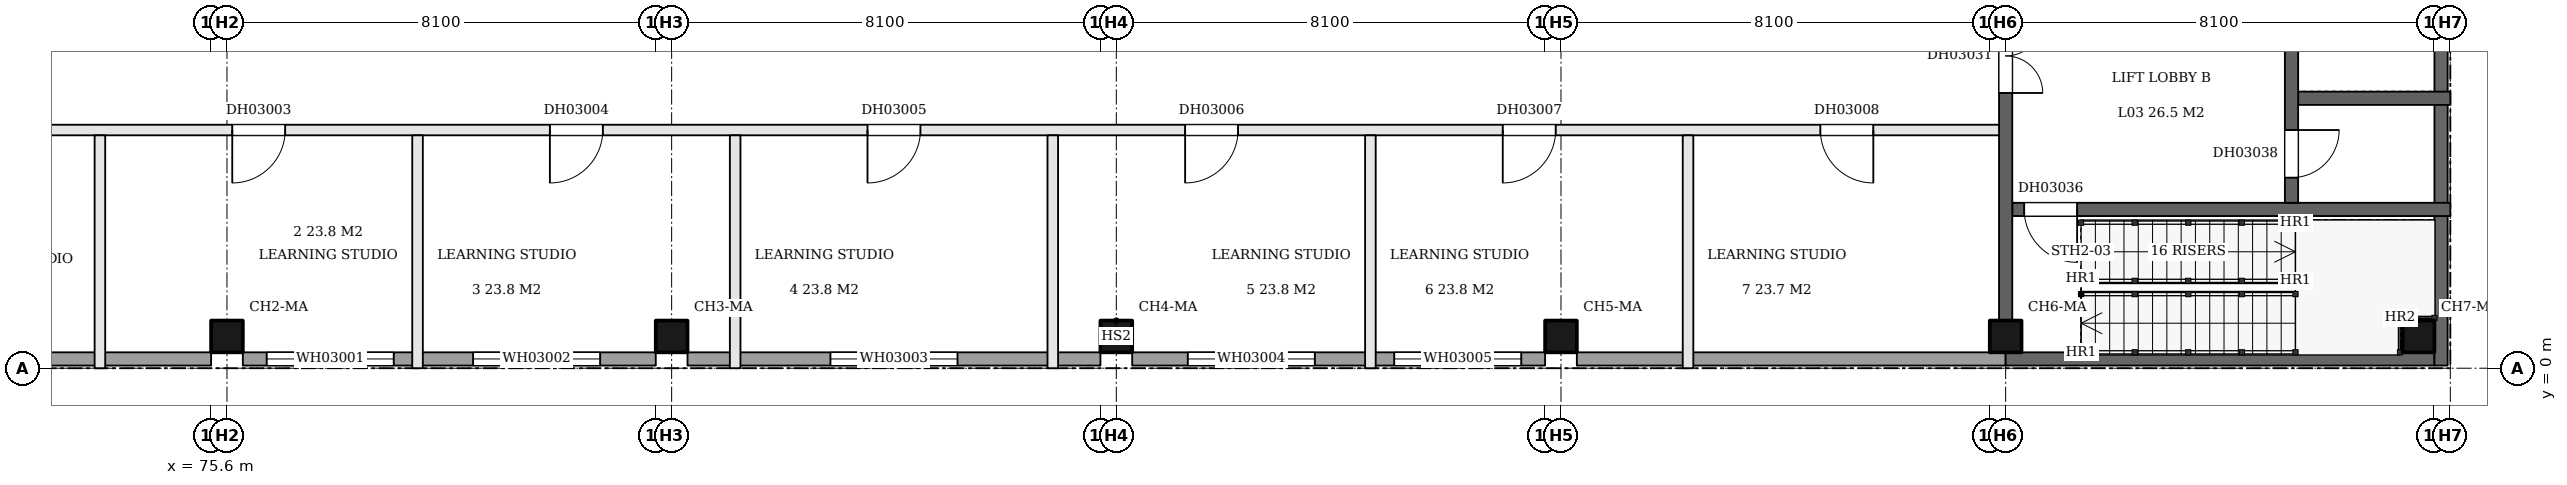
"""IFC4 building model, lengths in metres.
Left out: names, types, materials, properties, quantities, classifications, styles, units other than length and angle.
Written with IfcOpenShell. Run it as: python <this file> out.ifc"""

import sys

from ifc_helpers import new_model, si_unit, direction, frame, frame_2d, origin, origin_2d, place, context, subcontext, project, spatial, rectangle, extrude, element, fill, save


model = new_model("IFC4")
c1 = context("Model", 3, precision=1e-05, world=origin(), true_north=direction((0.0, 1.0)))
c2 = subcontext(c1, "Body", "Model", "MODEL_VIEW")
j1 = project(units=[si_unit("LENGTHUNIT", "METRE"), si_unit("PLANEANGLEUNIT", "RADIAN")], contexts=[c1])
p1 = place(None, origin())
s1 = spatial("IfcSite", under=j1, at=p1, CompositionType="ELEMENT")
p2 = place(p1, origin())
s2 = spatial("IfcBuilding", under=s1, at=p2, CompositionType="ELEMENT")
p3 = place(p2, frame((0.0, 0.0, 19.8)))
s3 = spatial("IfcBuildingStorey", under=s2, at=p3, CompositionType="ELEMENT", Elevation=19.8)
for number, where, z_axis, x_axis in (
    (1, (75.9, 0.6, 0.0), (0.0, 0.0, 1.0), (1.0, 0.0, 0.0)),
    (2, (84.3, 0.6, 0.0), (0.0, 0.0, 1.0), (1.0, 0.0, 0.0)),
    (3, (92.7, 0.6, 0.0), (0.0, 0.0, 1.0), (1.0, 0.0, 0.0)),
    (4, (101.1, 0.6, 0.0), (0.0, 0.0, 1.0), (1.0, 0.0, 0.0)),
    (5, (109.5, 0.6, 0.0), (0.0, 0.0, 1.0), (1.0, 0.0, 0.0)),
    (6, (117.3, 0.6, 0.0), (0.0, 0.0, 1.0), (1.0, 0.0, 0.0)),
):
    element("IfcColumn", number, at=place(p3, frame(where, z_axis=z_axis, x_axis=x_axis)), inside=s3, PredefinedType="COLUMN", context=c2, shape_type="SweptSolid", body=[
        extrude(rectangle(XDim=0.6, YDim=0.6, at=origin_2d()), origin(), (0.0, 0.0, 1.0), 5.0),
    ])
p4 = place(p3, frame((68.4, 0.175, 0.0), z_axis=(0.0, 0.0, 1.0), x_axis=(1.0, 0.0, 0.0)))
e7 = element("IfcWall", 7, at=p4, inside=s3, PredefinedType="SOLIDWALL", context=c2, shape_type="SweptSolid", body=[
    extrude(rectangle(XDim=7.2, YDim=0.25, at=frame_2d((3.6, 0.0))), origin(), (0.0, 0.0, 1.0), 5.0),
])
p5 = place(p3, frame((76.2, 0.175, 0.0), z_axis=(0.0, 0.0, 1.0), x_axis=(1.0, 0.0, 0.0)))
e8 = element("IfcWall", 8, at=p5, inside=s3, PredefinedType="SOLIDWALL", context=c2, shape_type="SweptSolid", body=[
    extrude(rectangle(XDim=7.8, YDim=0.25, at=frame_2d((3.9, 0.0))), origin(), (0.0, 0.0, 1.0), 5.0),
])
p6 = place(p5, frame((0.45, 0.0, 0.9)))
e9 = element("IfcOpeningElement", 9, at=p6, cuts=e8, PredefinedType="OPENING", context=c2, shape_type="SweptSolid", body=[
    extrude(rectangle(XDim=2.4, YDim=1.5, at=frame_2d((1.2, 0.75))), frame((0.0, 0.135, 0.0), z_axis=(0.0, -1.0, 0.0), x_axis=(1.0, 0.0, 0.0)), (0.0, 0.0, 1.0), 0.27),
])
p7 = place(p5, frame((4.35, 0.0, 0.9)))
e10 = element("IfcOpeningElement", 10, at=p7, cuts=e8, PredefinedType="OPENING", context=c2, shape_type="SweptSolid", body=[
    extrude(rectangle(XDim=2.4, YDim=1.5, at=frame_2d((1.2, 0.75))), frame((0.0, 0.135, 0.0), z_axis=(0.0, -1.0, 0.0), x_axis=(1.0, 0.0, 0.0)), (0.0, 0.0, 1.0), 0.27),
])
p8 = place(p3, frame((84.6, 0.175, 0.0), z_axis=(0.0, 0.0, 1.0), x_axis=(1.0, 0.0, 0.0)))
e11 = element("IfcWall", 11, at=p8, inside=s3, PredefinedType="SOLIDWALL", context=c2, shape_type="SweptSolid", body=[
    extrude(rectangle(XDim=7.8, YDim=0.25, at=frame_2d((3.9, 0.0))), origin(), (0.0, 0.0, 1.0), 5.0),
])
p9 = place(p8, frame((2.7, 0.0, 0.9)))
e12 = element("IfcOpeningElement", 12, at=p9, cuts=e11, PredefinedType="OPENING", context=c2, shape_type="SweptSolid", body=[
    extrude(rectangle(XDim=2.4, YDim=1.5, at=frame_2d((1.2, 0.75))), frame((0.0, 0.135, 0.0), z_axis=(0.0, -1.0, 0.0), x_axis=(1.0, 0.0, 0.0)), (0.0, 0.0, 1.0), 0.27),
])
p10 = place(p3, frame((93.0, 0.175, 0.0), z_axis=(0.0, 0.0, 1.0), x_axis=(1.0, 0.0, 0.0)))
e13 = element("IfcWall", 13, at=p10, inside=s3, PredefinedType="SOLIDWALL", context=c2, shape_type="SweptSolid", body=[
    extrude(rectangle(XDim=7.8, YDim=0.25, at=frame_2d((3.9, 0.0))), origin(), (0.0, 0.0, 1.0), 5.0),
])
p11 = place(p10, frame((1.05, 0.0, 0.9)))
e14 = element("IfcOpeningElement", 14, at=p11, cuts=e13, PredefinedType="OPENING", context=c2, shape_type="SweptSolid", body=[
    extrude(rectangle(XDim=2.4, YDim=1.5, at=frame_2d((1.2, 0.75))), frame((0.0, 0.135, 0.0), z_axis=(0.0, -1.0, 0.0), x_axis=(1.0, 0.0, 0.0)), (0.0, 0.0, 1.0), 0.27),
])
p12 = place(p10, frame((4.95, 0.0, 0.9)))
e15 = element("IfcOpeningElement", 15, at=p12, cuts=e13, PredefinedType="OPENING", context=c2, shape_type="SweptSolid", body=[
    extrude(rectangle(XDim=2.4, YDim=1.5, at=frame_2d((1.2, 0.75))), frame((0.0, 0.135, 0.0), z_axis=(0.0, -1.0, 0.0), x_axis=(1.0, 0.0, 0.0)), (0.0, 0.0, 1.0), 0.27),
])
p13 = place(p3, frame((101.4, 0.175, 0.0), z_axis=(0.0, 0.0, 1.0), x_axis=(1.0, 0.0, 0.0)))
e16 = element("IfcWall", 16, at=p13, inside=s3, PredefinedType="SOLIDWALL", context=c2, shape_type="SweptSolid", body=[
    extrude(rectangle(XDim=8.1, YDim=0.25, at=frame_2d((4.05, 0.0))), origin(), (0.0, 0.0, 1.0), 5.0),
])
p14 = place(p3, frame((109.5, 0.175, 0.0), z_axis=(0.0, 0.0, 1.0), x_axis=(1.0, 0.0, 0.0)))
e17 = element("IfcWall", 17, at=p14, inside=s3, PredefinedType="SHEAR", context=c2, shape_type="SweptSolid", body=[
    extrude(rectangle(XDim=8.1, YDim=0.25, at=frame_2d((4.05, 0.0))), origin(), (0.0, 0.0, 1.0), 5.0),
])
p15 = place(p3, frame((109.625, 3.0, 0.0), z_axis=(0.0, 0.0, 1.0), x_axis=(1.0, 0.0, 0.0)))
e18 = element("IfcWall", 18, at=p15, inside=s3, PredefinedType="SHEAR", context=c2, shape_type="SweptSolid", body=[
    extrude(rectangle(XDim=8.275, YDim=0.25, at=frame_2d((4.137, 0.0))), origin(), (0.0, 0.0, 1.0), 5.0),
])
p16 = place(p15, frame((0.225, 0.0, 0.0)))
e19 = element("IfcOpeningElement", 19, at=p16, cuts=e18, PredefinedType="OPENING", context=c2, shape_type="SweptSolid", body=[
    extrude(rectangle(XDim=1.0, YDim=2.1, at=frame_2d((0.5, 1.05))), frame((0.0, 0.135, 0.0), z_axis=(0.0, -1.0, 0.0), x_axis=(1.0, 0.0, 0.0)), (0.0, 0.0, 1.0), 0.27),
])
p17 = place(p3, frame((68.4, 4.5, 0.0), z_axis=(0.0, 0.0, 1.0), x_axis=(1.0, 0.0, 0.0)))
e20 = element("IfcWall", 20, at=p17, inside=s3, PredefinedType="PARTITIONING", context=c2, shape_type="SweptSolid", body=[
    extrude(rectangle(XDim=40.975, YDim=0.2, at=frame_2d((20.488, 0.0))), origin(), (0.0, 0.0, 1.0), 5.0),
])
p18 = place(p17, frame((1.6, 0.0, 0.0)))
e21 = element("IfcOpeningElement", 21, at=p18, cuts=e20, PredefinedType="OPENING", context=c2, shape_type="SweptSolid", body=[
    extrude(rectangle(XDim=1.0, YDim=2.1, at=frame_2d((0.5, 1.05))), frame((0.0, 0.11, 0.0), z_axis=(0.0, -1.0, 0.0), x_axis=(1.0, 0.0, 0.0)), (0.0, 0.0, 1.0), 0.22),
])
p19 = place(p17, frame((7.6, 0.0, 0.0)))
e22 = element("IfcOpeningElement", 22, at=p19, cuts=e20, PredefinedType="OPENING", context=c2, shape_type="SweptSolid", body=[
    extrude(rectangle(XDim=1.0, YDim=2.1, at=frame_2d((0.5, 1.05))), frame((0.0, 0.11, 0.0), z_axis=(0.0, -1.0, 0.0), x_axis=(1.0, 0.0, 0.0)), (0.0, 0.0, 1.0), 0.22),
])
p20 = place(p17, frame((13.6, 0.0, 0.0)))
e23 = element("IfcOpeningElement", 23, at=p20, cuts=e20, PredefinedType="OPENING", context=c2, shape_type="SweptSolid", body=[
    extrude(rectangle(XDim=1.0, YDim=2.1, at=frame_2d((0.5, 1.05))), frame((0.0, 0.11, 0.0), z_axis=(0.0, -1.0, 0.0), x_axis=(1.0, 0.0, 0.0)), (0.0, 0.0, 1.0), 0.22),
])
p21 = place(p17, frame((19.6, 0.0, 0.0)))
e24 = element("IfcOpeningElement", 24, at=p21, cuts=e20, PredefinedType="OPENING", context=c2, shape_type="SweptSolid", body=[
    extrude(rectangle(XDim=1.0, YDim=2.1, at=frame_2d((0.5, 1.05))), frame((0.0, 0.11, 0.0), z_axis=(0.0, -1.0, 0.0), x_axis=(1.0, 0.0, 0.0)), (0.0, 0.0, 1.0), 0.22),
])
p22 = place(p17, frame((25.6, 0.0, 0.0)))
e25 = element("IfcOpeningElement", 25, at=p22, cuts=e20, PredefinedType="OPENING", context=c2, shape_type="SweptSolid", body=[
    extrude(rectangle(XDim=1.0, YDim=2.1, at=frame_2d((0.5, 1.05))), frame((0.0, 0.11, 0.0), z_axis=(0.0, -1.0, 0.0), x_axis=(1.0, 0.0, 0.0)), (0.0, 0.0, 1.0), 0.22),
])
p23 = place(p17, frame((31.6, 0.0, 0.0)))
e26 = element("IfcOpeningElement", 26, at=p23, cuts=e20, PredefinedType="OPENING", context=c2, shape_type="SweptSolid", body=[
    extrude(rectangle(XDim=1.0, YDim=2.1, at=frame_2d((0.5, 1.05))), frame((0.0, 0.11, 0.0), z_axis=(0.0, -1.0, 0.0), x_axis=(1.0, 0.0, 0.0)), (0.0, 0.0, 1.0), 0.22),
])
p24 = place(p17, frame((37.6, 0.0, 0.0)))
e27 = element("IfcOpeningElement", 27, at=p24, cuts=e20, PredefinedType="OPENING", context=c2, shape_type="SweptSolid", body=[
    extrude(rectangle(XDim=1.0, YDim=2.1, at=frame_2d((0.5, 1.05))), frame((0.0, 0.11, 0.0), z_axis=(0.0, -1.0, 0.0), x_axis=(1.0, 0.0, 0.0)), (0.0, 0.0, 1.0), 0.22),
])
p25 = place(p3, frame((115.025, 5.1, 0.0), z_axis=(0.0, 0.0, 1.0), x_axis=(1.0, 0.0, 0.0)))
e28 = element("IfcWall", 28, at=p25, inside=s3, PredefinedType="SHEAR", context=c2, shape_type="SweptSolid", body=[
    extrude(rectangle(XDim=2.875, YDim=0.25, at=frame_2d((1.438, 0.0))), origin(), (0.0, 0.0, 1.0), 5.0),
])
for number, where, z_axis, x_axis in (
    (29, (73.5, 0.0, 0.0), (0.0, 0.0, 1.0), (0.0, 1.0, 0.0)),
    (30, (79.5, 0.0, 0.0), (0.0, 0.0, 1.0), (0.0, 1.0, 0.0)),
    (31, (85.5, 0.0, 0.0), (0.0, 0.0, 1.0), (0.0, 1.0, 0.0)),
    (32, (91.5, 0.0, 0.0), (0.0, 0.0, 1.0), (0.0, 1.0, 0.0)),
    (33, (97.5, 0.0, 0.0), (0.0, 0.0, 1.0), (0.0, 1.0, 0.0)),
    (34, (103.5, 0.0, 0.0), (0.0, 0.0, 1.0), (0.0, 1.0, 0.0)),
):
    element("IfcWall", number, at=place(p3, frame(where, z_axis=z_axis, x_axis=x_axis)), inside=s3, PredefinedType="PARTITIONING", context=c2, shape_type="SweptSolid", body=[
        extrude(rectangle(XDim=4.4, YDim=0.2, at=frame_2d((2.2, 0.0))), origin(), (0.0, 0.0, 1.0), 5.0),
    ])
p26 = place(p3, frame((109.5, 0.9, 0.0), z_axis=(0.0, 0.0, 1.0), x_axis=(0.0, 1.0, 0.0)))
e35 = element("IfcWall", 35, at=p26, inside=s3, PredefinedType="SHEAR", context=c2, shape_type="SweptSolid", body=[
    extrude(rectangle(XDim=7.2, YDim=0.25, at=frame_2d((3.6, 0.0))), origin(), (0.0, 0.0, 1.0), 5.0),
])
p27 = place(p26, frame((4.3, 0.0, 0.0)))
e36 = element("IfcOpeningElement", 36, at=p27, cuts=e35, PredefinedType="OPENING", context=c2, shape_type="SweptSolid", body=[
    extrude(rectangle(XDim=1.4, YDim=2.1, at=frame_2d((0.7, 1.05))), frame((0.0, 0.135, 0.0), z_axis=(0.0, -1.0, 0.0), x_axis=(1.0, 0.0, 0.0)), (0.0, 0.0, 1.0), 0.27),
])
p28 = place(p3, frame((114.9, 3.125, 0.0), z_axis=(0.0, 0.0, 1.0), x_axis=(0.0, 1.0, 0.0)))
e37 = element("IfcWall", 37, at=p28, inside=s3, PredefinedType="SHEAR", context=c2, shape_type="SweptSolid", body=[
    extrude(rectangle(XDim=5.15, YDim=0.25, at=frame_2d((2.575, 0.0))), origin(), (0.0, 0.0, 1.0), 5.0),
])
p29 = place(p28, frame((3.075, 0.0, 0.0)))
e38 = element("IfcOpeningElement", 38, at=p29, cuts=e37, PredefinedType="OPENING", context=c2, shape_type="SweptSolid", body=[
    extrude(rectangle(XDim=1.1, YDim=2.1, at=frame_2d((0.55, 1.05))), frame((0.0, 0.135, 0.0), z_axis=(0.0, -1.0, 0.0), x_axis=(1.0, 0.0, 0.0)), (0.0, 0.0, 1.0), 0.27),
])
p30 = place(p28, frame((0.475, 0.0, 0.0)))
e39 = element("IfcOpeningElement", 39, at=p30, cuts=e37, PredefinedType="OPENING", context=c2, shape_type="SweptSolid", body=[
    extrude(rectangle(XDim=0.9, YDim=2.1, at=frame_2d((0.45, 1.05))), frame((0.0, 0.135, 0.0), z_axis=(0.0, -1.0, 0.0), x_axis=(1.0, 0.0, 0.0)), (0.0, 0.0, 1.0), 0.27),
])
p31 = place(p3, frame((117.725, 0.05, 0.0), z_axis=(0.0, 0.0, 1.0), x_axis=(0.0, 1.0, 0.0)))
e40 = element("IfcWall", 40, at=p31, inside=s3, PredefinedType="SHEAR", context=c2, shape_type="SweptSolid", body=[
    extrude(rectangle(XDim=8.35, YDim=0.25, at=frame_2d((4.175, 0.0))), origin(), (0.0, 0.0, 1.0), 5.0),
])
p32 = place(p19, frame((1.0, 0.0, 0.0), z_axis=(0.0, 0.0, 1.0), x_axis=(-1.0, 0.0, 0.0)))
e41 = element("IfcDoor", 41, at=p32, inside=s3, OperationType="SINGLE_SWING_RIGHT", PredefinedType="DOOR", context=c2, shape_type="SweptSolid", body=[
    extrude(rectangle(XDim=1.0, YDim=2.1, at=frame_2d((0.5, 1.05))), frame((0.0, 0.025, 0.0), z_axis=(0.0, -1.0, 0.0), x_axis=(1.0, 0.0, 0.0)), (0.0, 0.0, 1.0), 0.05),
])
fill(e22, e41)
p33 = place(p20, frame((1.0, 0.0, 0.0), z_axis=(0.0, 0.0, 1.0), x_axis=(-1.0, 0.0, 0.0)))
e42 = element("IfcDoor", 42, at=p33, inside=s3, OperationType="SINGLE_SWING_RIGHT", PredefinedType="DOOR", context=c2, shape_type="SweptSolid", body=[
    extrude(rectangle(XDim=1.0, YDim=2.1, at=frame_2d((0.5, 1.05))), frame((0.0, 0.025, 0.0), z_axis=(0.0, -1.0, 0.0), x_axis=(1.0, 0.0, 0.0)), (0.0, 0.0, 1.0), 0.05),
])
fill(e23, e42)
p34 = place(p21, frame((1.0, 0.0, 0.0), z_axis=(0.0, 0.0, 1.0), x_axis=(-1.0, 0.0, 0.0)))
e43 = element("IfcDoor", 43, at=p34, inside=s3, OperationType="SINGLE_SWING_RIGHT", PredefinedType="DOOR", context=c2, shape_type="SweptSolid", body=[
    extrude(rectangle(XDim=1.0, YDim=2.1, at=frame_2d((0.5, 1.05))), frame((0.0, 0.025, 0.0), z_axis=(0.0, -1.0, 0.0), x_axis=(1.0, 0.0, 0.0)), (0.0, 0.0, 1.0), 0.05),
])
fill(e24, e43)
p35 = place(p22, frame((1.0, 0.0, 0.0), z_axis=(0.0, 0.0, 1.0), x_axis=(-1.0, 0.0, 0.0)))
e44 = element("IfcDoor", 44, at=p35, inside=s3, OperationType="SINGLE_SWING_RIGHT", PredefinedType="DOOR", context=c2, shape_type="SweptSolid", body=[
    extrude(rectangle(XDim=1.0, YDim=2.1, at=frame_2d((0.5, 1.05))), frame((0.0, 0.025, 0.0), z_axis=(0.0, -1.0, 0.0), x_axis=(1.0, 0.0, 0.0)), (0.0, 0.0, 1.0), 0.05),
])
fill(e25, e44)
p36 = place(p23, frame((1.0, 0.0, 0.0), z_axis=(0.0, 0.0, 1.0), x_axis=(-1.0, 0.0, 0.0)))
e45 = element("IfcDoor", 45, at=p36, inside=s3, OperationType="SINGLE_SWING_RIGHT", PredefinedType="DOOR", context=c2, shape_type="SweptSolid", body=[
    extrude(rectangle(XDim=1.0, YDim=2.1, at=frame_2d((0.5, 1.05))), frame((0.0, 0.025, 0.0), z_axis=(0.0, -1.0, 0.0), x_axis=(1.0, 0.0, 0.0)), (0.0, 0.0, 1.0), 0.05),
])
fill(e26, e45)
p37 = place(p24, frame((1.0, 0.0, 0.0), z_axis=(0.0, 0.0, 1.0), x_axis=(-1.0, 0.0, 0.0)))
e46 = element("IfcDoor", 46, at=p37, inside=s3, OperationType="SINGLE_SWING_LEFT", PredefinedType="DOOR", context=c2, shape_type="SweptSolid", body=[
    extrude(rectangle(XDim=1.0, YDim=2.1, at=frame_2d((0.5, 1.05))), frame((0.0, 0.025, 0.0), z_axis=(0.0, -1.0, 0.0), x_axis=(1.0, 0.0, 0.0)), (0.0, 0.0, 1.0), 0.05),
])
fill(e27, e46)
p38 = place(p27, frame((1.4, 0.0, 0.0), z_axis=(0.0, 0.0, 1.0), x_axis=(-1.0, 0.0, 0.0)))
e47 = element("IfcDoor", 47, at=p38, inside=s3, OperationType="DOUBLE_DOOR_SINGLE_SWING", PredefinedType="DOOR", context=c2, shape_type="SweptSolid", body=[
    extrude(rectangle(XDim=1.4, YDim=2.1, at=frame_2d((0.7, 1.05))), frame((0.0, 0.025, 0.0), z_axis=(0.0, -1.0, 0.0), x_axis=(1.0, 0.0, 0.0)), (0.0, 0.0, 1.0), 0.05),
])
fill(e36, e47)
p39 = place(p16, frame((1.0, 0.0, 0.0), z_axis=(0.0, 0.0, 1.0), x_axis=(-1.0, 0.0, 0.0)))
e48 = element("IfcDoor", 48, at=p39, inside=s3, OperationType="SINGLE_SWING_LEFT", PredefinedType="DOOR", context=c2, shape_type="SweptSolid", body=[
    extrude(rectangle(XDim=1.0, YDim=2.1, at=frame_2d((0.5, 1.05))), frame((0.0, 0.025, 0.0), z_axis=(0.0, -1.0, 0.0), x_axis=(1.0, 0.0, 0.0)), (0.0, 0.0, 1.0), 0.05),
])
fill(e19, e48)
p40 = place(p30, frame((0.9, 0.0, 0.0), z_axis=(0.0, 0.0, 1.0), x_axis=(-1.0, 0.0, 0.0)))
e49 = element("IfcDoor", 49, at=p40, inside=s3, OperationType="SINGLE_SWING_LEFT", PredefinedType="DOOR", context=c2, shape_type="SweptSolid", body=[
    extrude(rectangle(XDim=0.9, YDim=2.1, at=frame_2d((0.45, 1.05))), frame((0.0, 0.025, 0.0), z_axis=(0.0, -1.0, 0.0), x_axis=(1.0, 0.0, 0.0)), (0.0, 0.0, 1.0), 0.05),
])
fill(e39, e49)
p41 = place(p6, origin())
e50 = element("IfcWindow", 50, at=p41, inside=s3, PartitioningType="DOUBLE_PANEL_VERTICAL", PredefinedType="WINDOW", context=c2, shape_type="SweptSolid", body=[
    extrude(rectangle(XDim=2.4, YDim=1.5, at=frame_2d((1.2, 0.75))), frame((0.0, 0.03, 0.0), z_axis=(0.0, -1.0, 0.0), x_axis=(1.0, 0.0, 0.0)), (0.0, 0.0, 1.0), 0.06),
])
fill(e9, e50)
p42 = place(p7, origin())
e51 = element("IfcWindow", 51, at=p42, inside=s3, PartitioningType="DOUBLE_PANEL_VERTICAL", PredefinedType="WINDOW", context=c2, shape_type="SweptSolid", body=[
    extrude(rectangle(XDim=2.4, YDim=1.5, at=frame_2d((1.2, 0.75))), frame((0.0, 0.03, 0.0), z_axis=(0.0, -1.0, 0.0), x_axis=(1.0, 0.0, 0.0)), (0.0, 0.0, 1.0), 0.06),
])
fill(e10, e51)
p43 = place(p9, origin())
e52 = element("IfcWindow", 52, at=p43, inside=s3, PartitioningType="DOUBLE_PANEL_VERTICAL", PredefinedType="WINDOW", context=c2, shape_type="SweptSolid", body=[
    extrude(rectangle(XDim=2.4, YDim=1.5, at=frame_2d((1.2, 0.75))), frame((0.0, 0.03, 0.0), z_axis=(0.0, -1.0, 0.0), x_axis=(1.0, 0.0, 0.0)), (0.0, 0.0, 1.0), 0.06),
])
fill(e12, e52)
p44 = place(p11, origin())
e53 = element("IfcWindow", 53, at=p44, inside=s3, PartitioningType="DOUBLE_PANEL_VERTICAL", PredefinedType="WINDOW", context=c2, shape_type="SweptSolid", body=[
    extrude(rectangle(XDim=2.4, YDim=1.5, at=frame_2d((1.2, 0.75))), frame((0.0, 0.03, 0.0), z_axis=(0.0, -1.0, 0.0), x_axis=(1.0, 0.0, 0.0)), (0.0, 0.0, 1.0), 0.06),
])
fill(e14, e53)
p45 = place(p12, origin())
e54 = element("IfcWindow", 54, at=p45, inside=s3, PartitioningType="DOUBLE_PANEL_VERTICAL", PredefinedType="WINDOW", context=c2, shape_type="SweptSolid", body=[
    extrude(rectangle(XDim=2.4, YDim=1.5, at=frame_2d((1.2, 0.75))), frame((0.0, 0.03, 0.0), z_axis=(0.0, -1.0, 0.0), x_axis=(1.0, 0.0, 0.0)), (0.0, 0.0, 1.0), 0.06),
])
fill(e15, e54)
save(model, sys.argv[1])
